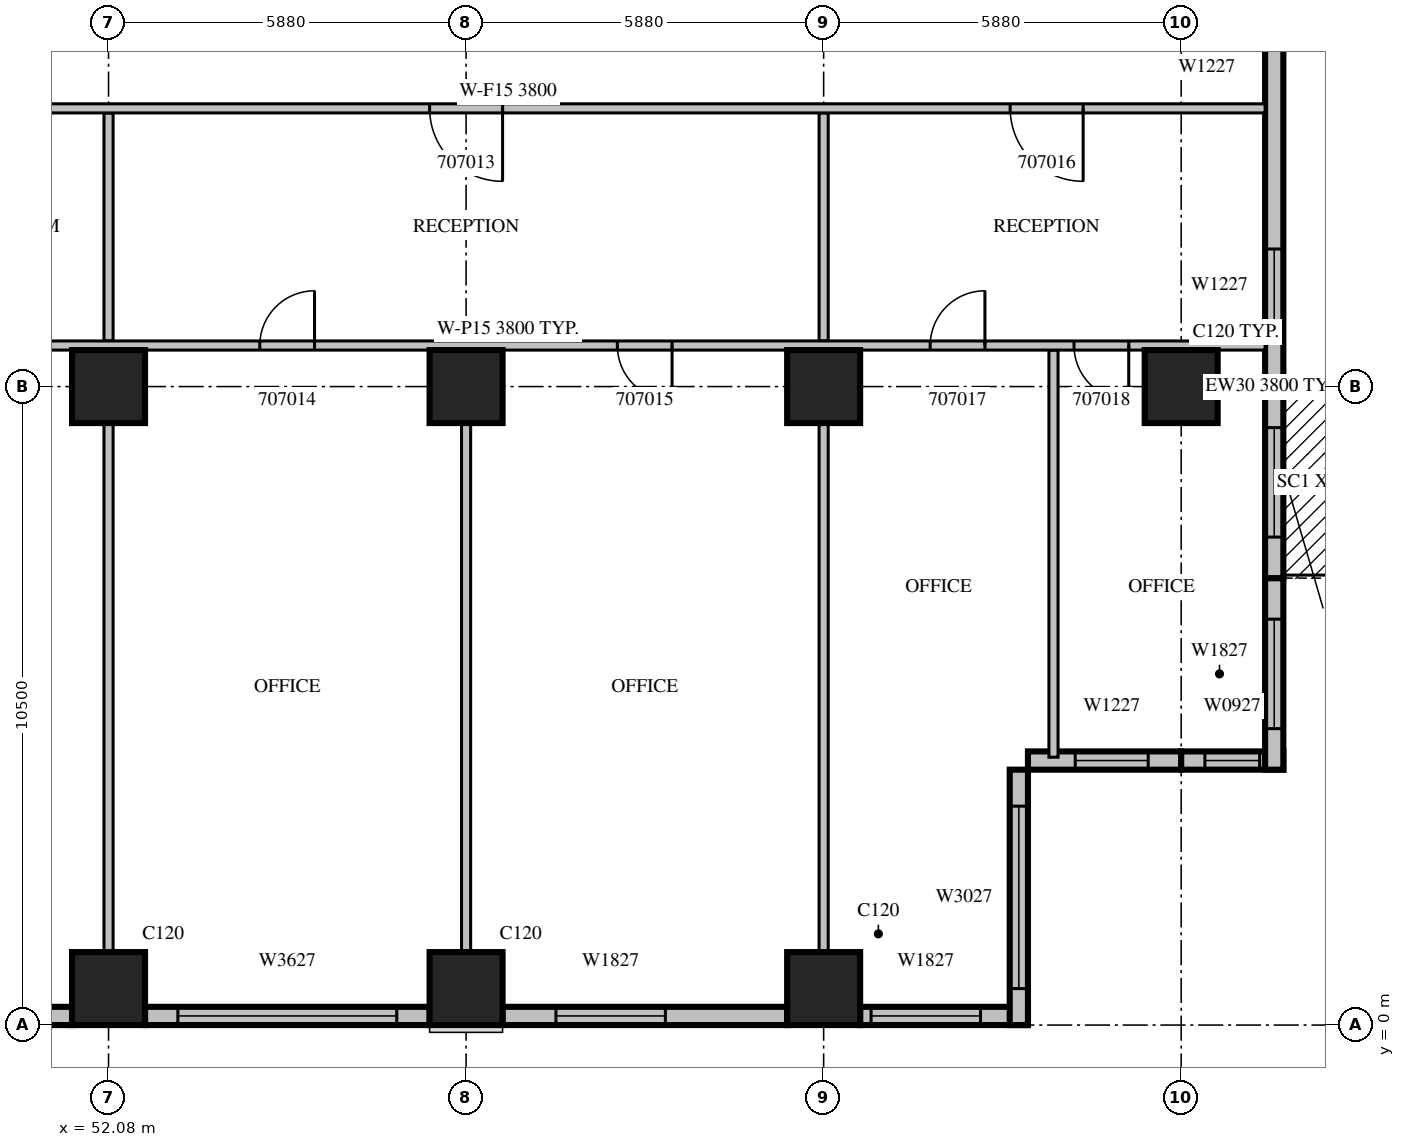
"""IFC4 building model, lengths in metres.
Left out: names, types, materials, properties, quantities, classifications, styles, units other than length and angle.
Written with IfcOpenShell. Run it as: python <this file> out.ifc"""

import sys

from ifc_helpers import new_model, si_unit, direction, frame, frame_2d, origin, origin_2d, place, context, subcontext, project, spatial, rectangle, extrude, source, transform, mapped, element, fill, save


model = new_model("IFC4")
c1 = context("Model", 3, precision=1e-05, world=origin(), true_north=direction((0.0, 1.0)))
c2 = subcontext(c1, "Body", "Model", "MODEL_VIEW")
j1 = project(units=[si_unit("LENGTHUNIT", "METRE"), si_unit("PLANEANGLEUNIT", "RADIAN")], contexts=[c1])
p1 = place(None, origin())
s1 = spatial("IfcSite", under=j1, at=p1, CompositionType="ELEMENT")
p2 = place(p1, origin())
s2 = spatial("IfcBuilding", under=s1, at=p2, CompositionType="ELEMENT")
p3 = place(p2, frame((0.0, 0.0, 40.5)))
s3 = spatial("IfcBuildingStorey", under=s2, at=p3, CompositionType="ELEMENT", Elevation=40.5)
m1 = source(origin(), c2, "Body", "SweptSolid", [
    extrude(rectangle(XDim=1.2, YDim=1.2, at=origin_2d()), origin(), (0.0, 0.0, 1.0), 4.2),
])
for number, where, z_axis, x_axis in (
    (1, (52.08, 0.6, 0.0), (0.0, 0.0, 1.0), (1.0, 0.0, 0.0)),
    (2, (57.96, 0.6, 0.0), (0.0, 0.0, 1.0), (1.0, 0.0, 0.0)),
    (3, (63.84, 0.6, 0.0), (0.0, 0.0, 1.0), (1.0, 0.0, 0.0)),
    (4, (52.08, 10.5, 0.0), (0.0, 0.0, 1.0), (1.0, 0.0, 0.0)),
    (5, (57.96, 10.5, 0.0), (0.0, 0.0, 1.0), (1.0, 0.0, 0.0)),
    (6, (63.84, 10.5, 0.0), (0.0, 0.0, 1.0), (1.0, 0.0, 0.0)),
    (7, (69.72, 10.5, 0.0), (0.0, 0.0, 1.0), (1.0, 0.0, 0.0)),
):
    element("IfcColumn", number, at=place(p3, frame(where, z_axis=z_axis, x_axis=x_axis)), inside=s3, PredefinedType="COLUMN", context=c2, shape_type="MappedRepresentation", body=[
        mapped(m1, transform((0.0, 0.0, 0.0), scale=1.0)),
    ])
p4 = place(p3, frame((46.8, 0.15, 0.0), z_axis=(0.0, 0.0, 1.0), x_axis=(1.0, 0.0, 0.0)))
e8 = element("IfcWall", 8, at=p4, inside=s3, PredefinedType="STANDARD", context=c2, shape_type="SweptSolid", body=[
    extrude(rectangle(XDim=4.68, YDim=0.3, at=frame_2d((2.34, 0.0))), origin(), (0.0, 0.0, 1.0), 3.3),
])
m2 = source(origin(), c2, "Body", "SweptSolid", [
    extrude(rectangle(XDim=3.6, YDim=2.7, at=frame_2d((1.8, 1.35))), frame((0.0, 0.16, 0.0), z_axis=(0.0, -1.0, 0.0), x_axis=(1.0, 0.0, 0.0)), (0.0, 0.0, 1.0), 0.32),
])
p5 = place(p4, frame((0.54, 0.0, 0.6)))
e9 = element("IfcOpeningElement", 9, at=p5, cuts=e8, PredefinedType="OPENING", context=c2, shape_type="MappedRepresentation", body=[
    mapped(m2, transform((0.0, 0.0, 0.0), scale=1.0)),
])
p6 = place(p3, frame((52.68, 0.15, 0.0), z_axis=(0.0, 0.0, 1.0), x_axis=(1.0, 0.0, 0.0)))
e10 = element("IfcWall", 10, at=p6, inside=s3, PredefinedType="STANDARD", context=c2, shape_type="SweptSolid", body=[
    extrude(rectangle(XDim=4.68, YDim=0.3, at=frame_2d((2.34, 0.0))), origin(), (0.0, 0.0, 1.0), 3.8),
])
p7 = place(p6, frame((0.54, 0.0, 0.6)))
e11 = element("IfcOpeningElement", 11, at=p7, cuts=e10, PredefinedType="OPENING", context=c2, shape_type="MappedRepresentation", body=[
    mapped(m2, transform((0.0, 0.0, 0.0), scale=1.0)),
])
m3 = source(origin(), c2, "Body", "SweptSolid", [
    extrude(rectangle(XDim=4.68, YDim=0.3, at=frame_2d((2.34, 0.0))), origin(), (0.0, 0.0, 1.0), 3.8),
])
p8 = place(p3, frame((58.56, 0.15, 0.0), z_axis=(0.0, 0.0, 1.0), x_axis=(1.0, 0.0, 0.0)))
e12 = element("IfcWall", 12, at=p8, inside=s3, PredefinedType="STANDARD", context=c2, shape_type="MappedRepresentation", body=[
    mapped(m3, transform((0.0, 0.0, 0.0), scale=1.0)),
])
m4 = source(origin(), c2, "Body", "SweptSolid", [
    extrude(rectangle(XDim=1.8, YDim=2.7, at=frame_2d((0.9, 1.35))), frame((0.0, 0.16, 0.0), z_axis=(0.0, -1.0, 0.0), x_axis=(1.0, 0.0, 0.0)), (0.0, 0.0, 1.0), 0.32),
])
p9 = place(p8, frame((0.877, 0.0, 0.6)))
e13 = element("IfcOpeningElement", 13, at=p9, cuts=e12, PredefinedType="OPENING", context=c2, shape_type="MappedRepresentation", body=[
    mapped(m4, transform((0.0, 0.0, 0.0), scale=1.0)),
])
p10 = place(p3, frame((64.44, 0.15, 0.0), z_axis=(0.0, 0.0, 1.0), x_axis=(1.0, 0.0, 0.0)))
e14 = element("IfcWall", 14, at=p10, inside=s3, PredefinedType="STANDARD", context=c2, shape_type="SweptSolid", body=[
    extrude(rectangle(XDim=2.76, YDim=0.3, at=frame_2d((1.38, 0.0))), origin(), (0.0, 0.0, 1.0), 3.8),
])
p11 = place(p10, frame((0.18, 0.0, 0.6)))
e15 = element("IfcOpeningElement", 15, at=p11, cuts=e14, PredefinedType="OPENING", context=c2, shape_type="MappedRepresentation", body=[
    mapped(m4, transform((0.0, 0.0, 0.0), scale=1.0)),
])
p12 = place(p3, frame((67.05, 0.0, 0.0), z_axis=(0.0, 0.0, 1.0), x_axis=(0.0, 1.0, 0.0)))
e16 = element("IfcWall", 16, at=p12, inside=s3, PredefinedType="STANDARD", context=c2, shape_type="SweptSolid", body=[
    extrude(rectangle(XDim=4.2, YDim=0.3, at=frame_2d((2.1, 0.0))), origin(), (0.0, 0.0, 1.0), 3.8),
])
p13 = place(p12, frame((0.6, 0.0, 0.6)))
e17 = element("IfcOpeningElement", 17, at=p13, cuts=e16, PredefinedType="OPENING", context=c2, shape_type="SweptSolid", body=[
    extrude(rectangle(XDim=3.0, YDim=2.7, at=frame_2d((1.5, 1.35))), frame((0.0, 0.16, 0.0), z_axis=(0.0, -1.0, 0.0), x_axis=(1.0, 0.0, 0.0)), (0.0, 0.0, 1.0), 0.32),
])
p14 = place(p3, frame((67.2, 4.35, 0.0), z_axis=(0.0, 0.0, 1.0), x_axis=(1.0, 0.0, 0.0)))
e18 = element("IfcWall", 18, at=p14, inside=s3, PredefinedType="STANDARD", context=c2, shape_type="SweptSolid", body=[
    extrude(rectangle(XDim=2.52, YDim=0.3, at=frame_2d((1.26, 0.0))), origin(), (0.0, 0.0, 1.0), 3.8),
])
m5 = source(origin(), c2, "Body", "SweptSolid", [
    extrude(rectangle(XDim=1.2, YDim=2.7, at=frame_2d((0.6, 1.35))), frame((0.0, 0.16, 0.0), z_axis=(0.0, -1.0, 0.0), x_axis=(1.0, 0.0, 0.0)), (0.0, 0.0, 1.0), 0.32),
])
p15 = place(p14, frame((0.777, 0.0, 0.6)))
e19 = element("IfcOpeningElement", 19, at=p15, cuts=e18, PredefinedType="OPENING", context=c2, shape_type="MappedRepresentation", body=[
    mapped(m5, transform((0.0, 0.0, 0.0), scale=1.0)),
])
p16 = place(p3, frame((69.72, 4.35, 0.0), z_axis=(0.0, 0.0, 1.0), x_axis=(1.0, 0.0, 0.0)))
e20 = element("IfcWall", 20, at=p16, inside=s3, PredefinedType="STANDARD", context=c2, shape_type="SweptSolid", body=[
    extrude(rectangle(XDim=1.68, YDim=0.3, at=frame_2d((0.84, 0.0))), origin(), (0.0, 0.0, 1.0), 3.8),
])
m6 = source(origin(), c2, "Body", "SweptSolid", [
    extrude(rectangle(XDim=0.9, YDim=2.7, at=frame_2d((0.45, 1.35))), frame((0.0, 0.16, 0.0), z_axis=(0.0, -1.0, 0.0), x_axis=(1.0, 0.0, 0.0)), (0.0, 0.0, 1.0), 0.32),
])
p17 = place(p16, frame((0.39, 0.0, 0.6)))
e21 = element("IfcOpeningElement", 21, at=p17, cuts=e20, PredefinedType="OPENING", context=c2, shape_type="MappedRepresentation", body=[
    mapped(m6, transform((0.0, 0.0, 0.0), scale=1.0)),
])
m7 = source(origin(), c2, "Body", "SweptSolid", [
    extrude(rectangle(XDim=3.15, YDim=0.3, at=frame_2d((1.575, 0.0))), origin(), (0.0, 0.0, 1.0), 3.8),
])
p18 = place(p3, frame((71.25, 4.2, 0.0), z_axis=(0.0, 0.0, 1.0), x_axis=(0.0, 1.0, 0.0)))
e22 = element("IfcWall", 22, at=p18, inside=s3, PredefinedType="STANDARD", context=c2, shape_type="MappedRepresentation", body=[
    mapped(m7, transform((0.0, 0.0, 0.0), scale=1.0)),
])
p19 = place(p18, frame((0.675, 0.0, 0.6)))
e23 = element("IfcOpeningElement", 23, at=p19, cuts=e22, PredefinedType="OPENING", context=c2, shape_type="MappedRepresentation", body=[
    mapped(m4, transform((0.0, 0.0, 0.0), scale=1.0)),
])
p20 = place(p3, frame((71.25, 7.35, 0.0), z_axis=(0.0, 0.0, 1.0), x_axis=(0.0, 1.0, 0.0)))
e24 = element("IfcWall", 24, at=p20, inside=s3, PredefinedType="STANDARD", context=c2, shape_type="MappedRepresentation", body=[
    mapped(m7, transform((0.0, 0.0, 0.0), scale=1.0)),
])
m8 = source(origin(), c2, "Body", "SweptSolid", [
    extrude(rectangle(XDim=1.8, YDim=2.4, at=frame_2d((0.9, 1.2))), frame((0.0, 0.16, 0.0), z_axis=(0.0, -1.0, 0.0), x_axis=(1.0, 0.0, 0.0)), (0.0, 0.0, 1.0), 0.32),
])
p21 = place(p20, frame((0.675, 0.0, 0.0)))
e25 = element("IfcOpeningElement", 25, at=p21, cuts=e24, PredefinedType="OPENING", context=c2, shape_type="MappedRepresentation", body=[
    mapped(m8, transform((0.0, 0.0, 0.0), scale=1.0)),
])
p22 = place(p3, frame((71.25, 10.5, 0.0), z_axis=(0.0, 0.0, 1.0), x_axis=(0.0, 1.0, 0.0)))
e26 = element("IfcWall", 26, at=p22, inside=s3, PredefinedType="STANDARD", context=c2, shape_type="SweptSolid", body=[
    extrude(rectangle(XDim=6.3, YDim=0.3, at=frame_2d((3.15, 0.0))), origin(), (0.0, 0.0, 1.0), 3.8),
])
p23 = place(p22, frame((1.062, 0.0, 0.6)))
e27 = element("IfcOpeningElement", 27, at=p23, cuts=e26, PredefinedType="OPENING", context=c2, shape_type="MappedRepresentation", body=[
    mapped(m5, transform((0.0, 0.0, 0.0), scale=1.0)),
])
m9 = source(origin(), c2, "Body", "SweptSolid", [
    extrude(rectangle(XDim=8.702, YDim=0.15, at=frame_2d((4.351, 0.0))), origin(), (0.0, 0.0, 1.0), 3.8),
])
p24 = place(p3, frame((57.96, 1.199, 0.0), z_axis=(0.0, 0.0, 1.0), x_axis=(0.0, 1.0, 0.0)))
e28 = element("IfcWall", 28, at=p24, inside=s3, PredefinedType="PARTITIONING", context=c2, shape_type="MappedRepresentation", body=[
    mapped(m9, transform((0.0, 0.0, 0.0), scale=1.0)),
])
p25 = place(p3, frame((67.62, 4.405, 0.0), z_axis=(0.0, 0.0, 1.0), x_axis=(0.0, 1.0, 0.0)))
e29 = element("IfcWall", 29, at=p25, inside=s3, PredefinedType="PARTITIONING", context=c2, shape_type="SweptSolid", body=[
    extrude(rectangle(XDim=6.695, YDim=0.15, at=frame_2d((3.348, 0.0))), origin(), (0.0, 0.0, 1.0), 3.8),
])
p26 = place(p3, frame((52.08, 1.199, 0.0), z_axis=(0.0, 0.0, 1.0), x_axis=(0.0, 1.0, 0.0)))
e30 = element("IfcWall", 30, at=p26, inside=s3, PredefinedType="PARTITIONING", context=c2, shape_type="MappedRepresentation", body=[
    mapped(m9, transform((0.0, 0.0, 0.0), scale=1.0)),
])
m10 = source(origin(), c2, "Body", "SweptSolid", [
    extrude(rectangle(XDim=3.75, YDim=0.15, at=frame_2d((1.875, 0.0))), origin(), (0.0, 0.0, 1.0), 3.8),
])
p27 = place(p3, frame((52.08, 11.25, 0.0), z_axis=(0.0, 0.0, 1.0), x_axis=(0.0, 1.0, 0.0)))
e31 = element("IfcWall", 31, at=p27, inside=s3, PredefinedType="PARTITIONING", context=c2, shape_type="MappedRepresentation", body=[
    mapped(m10, transform((0.0, 0.0, 0.0), scale=1.0)),
])
p28 = place(p3, frame((63.84, 1.199, 0.0), z_axis=(0.0, 0.0, 1.0), x_axis=(0.0, 1.0, 0.0)))
e32 = element("IfcWall", 32, at=p28, inside=s3, PredefinedType="PARTITIONING", context=c2, shape_type="MappedRepresentation", body=[
    mapped(m9, transform((0.0, 0.0, 0.0), scale=1.0)),
])
p29 = place(p3, frame((63.84, 11.25, 0.0), z_axis=(0.0, 0.0, 1.0), x_axis=(0.0, 1.0, 0.0)))
e33 = element("IfcWall", 33, at=p29, inside=s3, PredefinedType="PARTITIONING", context=c2, shape_type="MappedRepresentation", body=[
    mapped(m10, transform((0.0, 0.0, 0.0), scale=1.0)),
])
p30 = place(p3, frame((71.1, 11.175, 0.0), z_axis=(0.0, 0.0, 1.0), x_axis=(-1.0, 0.0, 0.0)))
e34 = element("IfcWall", 34, at=p30, inside=s3, PredefinedType="PARTITIONING", context=c2, shape_type="SweptSolid", body=[
    extrude(rectangle(XDim=24.9, YDim=0.15, at=frame_2d((12.45, 0.0))), origin(), (0.0, 0.0, 1.0), 3.8),
])
m11 = source(origin(), c2, "Body", "SweptSolid", [
    extrude(rectangle(XDim=1.1, YDim=2.1, at=frame_2d((0.55, 1.05))), frame((0.0, 0.085, 0.0), z_axis=(0.0, -1.0, 0.0), x_axis=(1.0, 0.0, 0.0)), (0.0, 0.0, 1.0), 0.17),
])
p31 = place(p30, frame((22.875, 0.0, 0.0)))
e35 = element("IfcOpeningElement", 35, at=p31, cuts=e34, PredefinedType="OPENING", context=c2, shape_type="MappedRepresentation", body=[
    mapped(m11, transform((0.0, 0.0, 0.0), scale=1.0)),
])
m12 = source(origin(), c2, "Body", "SweptSolid", [
    extrude(rectangle(XDim=0.9, YDim=2.1, at=frame_2d((0.45, 1.05))), frame((0.0, 0.085, 0.0), z_axis=(0.0, -1.0, 0.0), x_axis=(1.0, 0.0, 0.0)), (0.0, 0.0, 1.0), 0.17),
])
p32 = place(p30, frame((15.633, 0.0, 0.0)))
e36 = element("IfcOpeningElement", 36, at=p32, cuts=e34, PredefinedType="OPENING", context=c2, shape_type="MappedRepresentation", body=[
    mapped(m12, transform((0.0, 0.0, 0.0), scale=1.0)),
])
p33 = place(p30, frame((9.752, 0.0, 0.0)))
e37 = element("IfcOpeningElement", 37, at=p33, cuts=e34, PredefinedType="OPENING", context=c2, shape_type="MappedRepresentation", body=[
    mapped(m12, transform((0.0, 0.0, 0.0), scale=1.0)),
])
p34 = place(p30, frame((4.607, 0.0, 0.0)))
e38 = element("IfcOpeningElement", 38, at=p34, cuts=e34, PredefinedType="OPENING", context=c2, shape_type="MappedRepresentation", body=[
    mapped(m12, transform((0.0, 0.0, 0.0), scale=1.0)),
])
p35 = place(p30, frame((2.243, 0.0, 0.0)))
e39 = element("IfcOpeningElement", 39, at=p35, cuts=e34, PredefinedType="OPENING", context=c2, shape_type="MappedRepresentation", body=[
    mapped(m12, transform((0.0, 0.0, 0.0), scale=1.0)),
])
m13 = source(origin(), c2, "Body", "SweptSolid", [
    extrude(rectangle(XDim=24.9, YDim=0.15, at=frame_2d((12.45, 0.0))), origin(), (0.0, 0.0, 1.0), 3.8),
])
p36 = place(p3, frame((71.1, 15.075, 0.0), z_axis=(0.0, 0.0, 1.0), x_axis=(-1.0, 0.0, 0.0)))
e40 = element("IfcWall", 40, at=p36, inside=s3, PredefinedType="PARTITIONING", context=c2, shape_type="MappedRepresentation", body=[
    mapped(m13, transform((0.0, 0.0, 0.0), scale=1.0)),
])
p37 = place(p36, frame((23.188, 0.0, 0.0)))
e41 = element("IfcOpeningElement", 41, at=p37, cuts=e40, PredefinedType="OPENING", context=c2, shape_type="SweptSolid", body=[
    extrude(rectangle(XDim=1.1, YDim=2.1, at=frame_2d((0.55, 1.05))), frame((0.0, 0.085, 0.0), z_axis=(0.0, -1.0, 0.0), x_axis=(1.0, 0.0, 0.0)), (0.0, 0.0, 1.0), 0.17),
])
p38 = place(p36, frame((20.348, 0.0, 0.0)))
e42 = element("IfcOpeningElement", 42, at=p38, cuts=e40, PredefinedType="OPENING", context=c2, shape_type="MappedRepresentation", body=[
    mapped(m12, transform((0.0, 0.0, 0.0), scale=1.0)),
])
m14 = source(origin(), c2, "Body", "SweptSolid", [
    extrude(rectangle(XDim=1.2, YDim=2.1, at=frame_2d((0.6, 1.05))), frame((0.0, 0.085, 0.0), z_axis=(0.0, -1.0, 0.0), x_axis=(1.0, 0.0, 0.0)), (0.0, 0.0, 1.0), 0.17),
])
p39 = place(p36, frame((12.54, 0.0, 0.0)))
e43 = element("IfcOpeningElement", 43, at=p39, cuts=e40, PredefinedType="OPENING", context=c2, shape_type="MappedRepresentation", body=[
    mapped(m14, transform((0.0, 0.0, 0.0), scale=1.0)),
])
p40 = place(p36, frame((2.993, 0.0, 0.0)))
e44 = element("IfcOpeningElement", 44, at=p40, cuts=e40, PredefinedType="OPENING", context=c2, shape_type="MappedRepresentation", body=[
    mapped(m14, transform((0.0, 0.0, 0.0), scale=1.0)),
])
m15 = source(origin(), c2, "Body", "SweptSolid", [
    extrude(rectangle(XDim=3.6, YDim=2.7, at=frame_2d((1.8, 1.35))), frame((0.0, 0.03, 0.0), z_axis=(0.0, -1.0, 0.0), x_axis=(1.0, 0.0, 0.0)), (0.0, 0.0, 1.0), 0.06),
])
p41 = place(p7, origin())
e45 = element("IfcWindow", 45, at=p41, inside=s3, PartitioningType="SINGLE_PANEL", PredefinedType="WINDOW", context=c2, shape_type="MappedRepresentation", body=[
    mapped(m15, transform((0.0, 0.0, 0.0), scale=1.0)),
])
fill(e11, e45)
m16 = source(origin(), c2, "Body", "SweptSolid", [
    extrude(rectangle(XDim=1.8, YDim=2.7, at=frame_2d((0.9, 1.35))), frame((0.0, 0.03, 0.0), z_axis=(0.0, -1.0, 0.0), x_axis=(1.0, 0.0, 0.0)), (0.0, 0.0, 1.0), 0.06),
])
p42 = place(p9, origin())
e46 = element("IfcWindow", 46, at=p42, inside=s3, PartitioningType="SINGLE_PANEL", PredefinedType="WINDOW", context=c2, shape_type="MappedRepresentation", body=[
    mapped(m16, transform((0.0, 0.0, 0.0), scale=1.0)),
])
fill(e13, e46)
p43 = place(p11, origin())
e47 = element("IfcWindow", 47, at=p43, inside=s3, PartitioningType="SINGLE_PANEL", PredefinedType="WINDOW", context=c2, shape_type="MappedRepresentation", body=[
    mapped(m16, transform((0.0, 0.0, 0.0), scale=1.0)),
])
fill(e15, e47)
p44 = place(p13, origin())
e48 = element("IfcWindow", 48, at=p44, inside=s3, PartitioningType="SINGLE_PANEL", PredefinedType="WINDOW", context=c2, shape_type="SweptSolid", body=[
    extrude(rectangle(XDim=3.0, YDim=2.7, at=frame_2d((1.5, 1.35))), frame((0.0, 0.03, 0.0), z_axis=(0.0, -1.0, 0.0), x_axis=(1.0, 0.0, 0.0)), (0.0, 0.0, 1.0), 0.06),
])
fill(e17, e48)
m17 = source(origin(), c2, "Body", "SweptSolid", [
    extrude(rectangle(XDim=1.2, YDim=2.7, at=frame_2d((0.6, 1.35))), frame((0.0, 0.03, 0.0), z_axis=(0.0, -1.0, 0.0), x_axis=(1.0, 0.0, 0.0)), (0.0, 0.0, 1.0), 0.06),
])
p45 = place(p15, origin())
e49 = element("IfcWindow", 49, at=p45, inside=s3, PartitioningType="SINGLE_PANEL", PredefinedType="WINDOW", context=c2, shape_type="MappedRepresentation", body=[
    mapped(m17, transform((0.0, 0.0, 0.0), scale=1.0)),
])
fill(e19, e49)
m18 = source(origin(), c2, "Body", "SweptSolid", [
    extrude(rectangle(XDim=0.9, YDim=2.7, at=frame_2d((0.45, 1.35))), frame((0.0, 0.03, 0.0), z_axis=(0.0, -1.0, 0.0), x_axis=(1.0, 0.0, 0.0)), (0.0, 0.0, 1.0), 0.06),
])
p46 = place(p17, origin())
e50 = element("IfcWindow", 50, at=p46, inside=s3, PartitioningType="SINGLE_PANEL", PredefinedType="WINDOW", context=c2, shape_type="MappedRepresentation", body=[
    mapped(m18, transform((0.0, 0.0, 0.0), scale=1.0)),
])
fill(e21, e50)
p47 = place(p19, origin())
e51 = element("IfcWindow", 51, at=p47, inside=s3, PartitioningType="SINGLE_PANEL", PredefinedType="WINDOW", context=c2, shape_type="MappedRepresentation", body=[
    mapped(m16, transform((0.0, 0.0, 0.0), scale=1.0)),
])
fill(e23, e51)
m19 = source(origin(), c2, "Body", "SweptSolid", [
    extrude(rectangle(XDim=1.8, YDim=2.4, at=frame_2d((0.9, 1.2))), frame((0.0, 0.025, 0.0), z_axis=(0.0, -1.0, 0.0), x_axis=(1.0, 0.0, 0.0)), (0.0, 0.0, 1.0), 0.05),
])
p48 = place(p21, origin())
e52 = element("IfcDoor", 52, at=p48, inside=s3, OperationType="SLIDING_TO_LEFT", PredefinedType="DOOR", context=c2, shape_type="MappedRepresentation", body=[
    mapped(m19, transform((0.0, 0.0, 0.0), scale=1.0)),
])
fill(e25, e52)
p49 = place(p23, origin())
e53 = element("IfcWindow", 53, at=p49, inside=s3, PartitioningType="SINGLE_PANEL", PredefinedType="WINDOW", context=c2, shape_type="MappedRepresentation", body=[
    mapped(m17, transform((0.0, 0.0, 0.0), scale=1.0)),
])
fill(e27, e53)
m20 = source(origin(), c2, "Body", "SweptSolid", [
    extrude(rectangle(XDim=1.2, YDim=2.1, at=frame_2d((0.6, 1.05))), frame((0.0, 0.025, 0.0), z_axis=(0.0, -1.0, 0.0), x_axis=(1.0, 0.0, 0.0)), (0.0, 0.0, 1.0), 0.05),
])
p50 = place(p39, origin())
e54 = element("IfcDoor", 54, at=p50, inside=s3, OperationType="SINGLE_SWING_LEFT", PredefinedType="DOOR", context=c2, shape_type="MappedRepresentation", body=[
    mapped(m20, transform((0.0, 0.0, 0.0), scale=1.0)),
])
fill(e43, e54)
m21 = source(origin(), c2, "Body", "SweptSolid", [
    extrude(rectangle(XDim=0.9, YDim=2.1, at=frame_2d((0.45, 1.05))), frame((0.0, 0.025, 0.0), z_axis=(0.0, -1.0, 0.0), x_axis=(1.0, 0.0, 0.0)), (0.0, 0.0, 1.0), 0.05),
])
p51 = place(p32, origin())
e55 = element("IfcDoor", 55, at=p51, inside=s3, OperationType="SINGLE_SWING_RIGHT", PredefinedType="DOOR", context=c2, shape_type="MappedRepresentation", body=[
    mapped(m21, transform((0.0, 0.0, 0.0), scale=1.0)),
])
fill(e36, e55)
p52 = place(p33, origin())
e56 = element("IfcDoor", 56, at=p52, inside=s3, OperationType="SINGLE_SWING_LEFT", PredefinedType="DOOR", context=c2, shape_type="MappedRepresentation", body=[
    mapped(m21, transform((0.0, 0.0, 0.0), scale=1.0)),
])
fill(e37, e56)
p53 = place(p40, origin())
e57 = element("IfcDoor", 57, at=p53, inside=s3, OperationType="SINGLE_SWING_LEFT", PredefinedType="DOOR", context=c2, shape_type="MappedRepresentation", body=[
    mapped(m20, transform((0.0, 0.0, 0.0), scale=1.0)),
])
fill(e44, e57)
p54 = place(p34, origin())
e58 = element("IfcDoor", 58, at=p54, inside=s3, OperationType="SINGLE_SWING_RIGHT", PredefinedType="DOOR", context=c2, shape_type="MappedRepresentation", body=[
    mapped(m21, transform((0.0, 0.0, 0.0), scale=1.0)),
])
fill(e38, e58)
p55 = place(p35, origin())
e59 = element("IfcDoor", 59, at=p55, inside=s3, OperationType="SINGLE_SWING_LEFT", PredefinedType="DOOR", context=c2, shape_type="MappedRepresentation", body=[
    mapped(m21, transform((0.0, 0.0, 0.0), scale=1.0)),
])
fill(e39, e59)
save(model, sys.argv[1])
